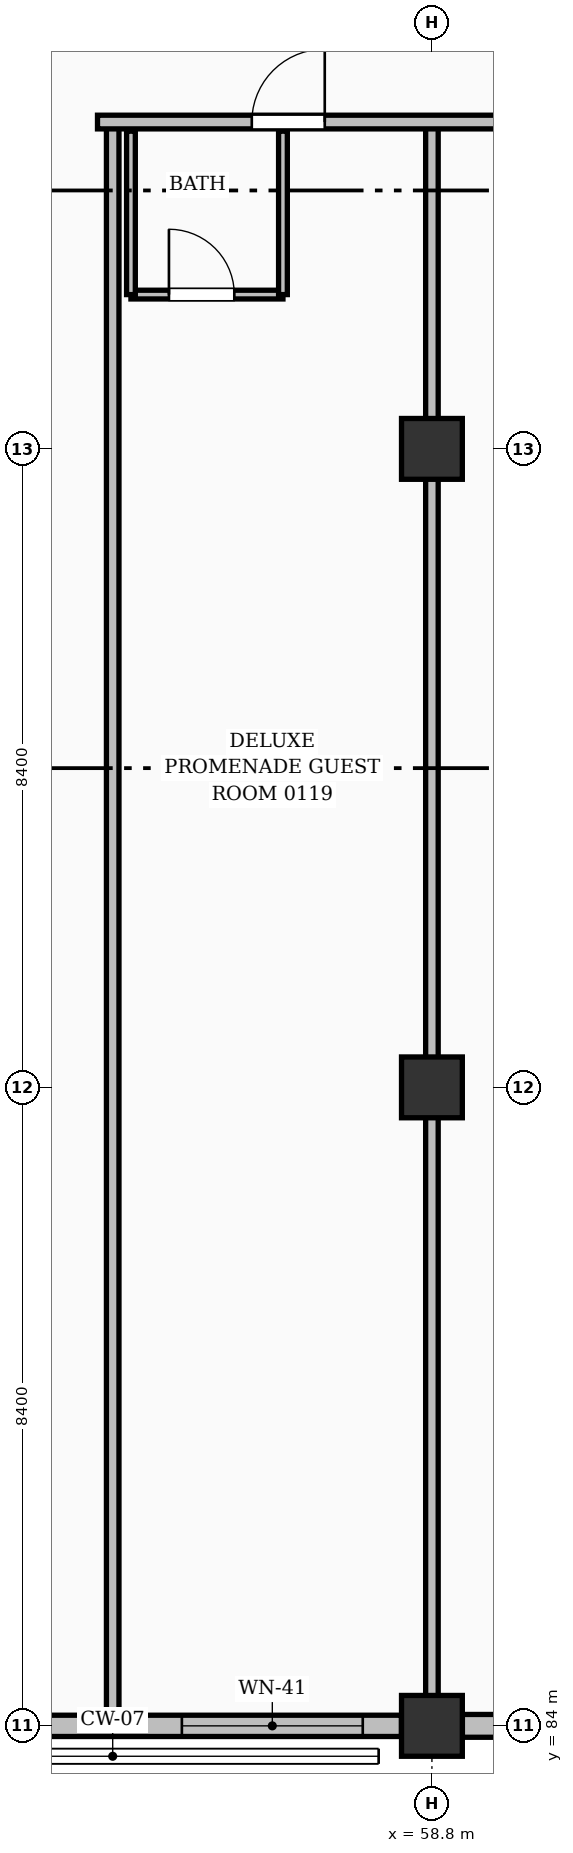
"""IFC4 building model, lengths in metres.
Left out: names, types, materials, properties, quantities, classifications, styles, units other than length and angle.
Written with IfcOpenShell. Run it as: python <this file> out.ifc"""

import sys

from ifc_helpers import new_model, si_unit, direction, frame, frame_2d, origin, origin_2d, place, context, subcontext, project, spatial, rectangle, extrude, element, fill, save


model = new_model("IFC4")
c1 = context("Model", 3, precision=1e-05, world=origin(), true_north=direction((0.0, 1.0)))
c2 = subcontext(c1, "Body", "Model", "MODEL_VIEW")
j1 = project(units=[si_unit("LENGTHUNIT", "METRE"), si_unit("PLANEANGLEUNIT", "RADIAN")], contexts=[c1])
p1 = place(None, origin())
s1 = spatial("IfcSite", under=j1, at=p1, CompositionType="ELEMENT")
p2 = place(p1, origin())
s2 = spatial("IfcBuilding", under=s1, at=p2, CompositionType="ELEMENT")
p3 = place(p2, frame((0.0, 0.0, 3.92)))
s3 = spatial("IfcBuildingStorey", under=s2, at=p3, CompositionType="ELEMENT", Elevation=3.92)
for number, where, z_axis, x_axis in (
    (1, (58.8, 84.0, 0.0), (0.0, 0.0, 1.0), (1.0, 0.0, 0.0)),
    (2, (58.8, 92.4, 0.0), (0.0, 0.0, 1.0), (1.0, 0.0, 0.0)),
    (3, (58.8, 100.8, 0.0), (0.0, 0.0, 1.0), (1.0, 0.0, 0.0)),
):
    element("IfcColumn", number, at=place(p3, frame(where, z_axis=z_axis, x_axis=x_axis)), inside=s3, PredefinedType="COLUMN", context=c2, shape_type="SweptSolid", body=[
        extrude(rectangle(XDim=0.8, YDim=0.8, at=origin_2d()), origin(), (0.0, 0.0, 1.0), 3.64),
    ])
p4 = place(p3, frame((50.801, 84.0, 0.0), z_axis=(0.0, 0.0, 1.0), x_axis=(1.0, 0.0, 0.0)))
e4 = element("IfcWall", 4, at=p4, inside=s3, PredefinedType="SOLIDWALL", context=c2, shape_type="SweptSolid", body=[
    extrude(rectangle(XDim=7.598, YDim=0.28, at=frame_2d((3.799, 0.0))), origin(), (0.0, 0.0, 1.0), 2.445),
])
p5 = place(p4, frame((0.489, 0.0, 0.25)))
e5 = element("IfcOpeningElement", 5, at=p5, cuts=e4, PredefinedType="OPENING", context=c2, shape_type="SweptSolid", body=[
    extrude(rectangle(XDim=2.42, YDim=1.9, at=frame_2d((1.21, 0.95))), frame((0.0, 0.15, 0.0), z_axis=(0.0, -1.0, 0.0), x_axis=(1.0, 0.0, 0.0)), (0.0, 0.0, 1.0), 0.3),
])
p6 = place(p4, frame((4.709, 0.0, 0.25)))
e6 = element("IfcOpeningElement", 6, at=p6, cuts=e4, PredefinedType="OPENING", context=c2, shape_type="SweptSolid", body=[
    extrude(rectangle(XDim=2.38, YDim=2.0, at=frame_2d((1.19, 1.0))), frame((0.0, 0.15, 0.0), z_axis=(0.0, -1.0, 0.0), x_axis=(1.0, 0.0, 0.0)), (0.0, 0.0, 1.0), 0.3),
])
p7 = place(p3, frame((59.201, 84.0, 0.0), z_axis=(0.0, 0.0, 1.0), x_axis=(1.0, 0.0, 0.0)))
e7 = element("IfcWall", 7, at=p7, inside=s3, PredefinedType="SOLIDWALL", context=c2, shape_type="SweptSolid", body=[
    extrude(rectangle(XDim=7.598, YDim=0.3, at=frame_2d((3.799, 0.0))), origin(), (0.0, 0.0, 1.0), 2.445),
])
p8 = place(p7, frame((0.874, 0.0, 0.0)))
e8 = element("IfcOpeningElement", 8, at=p8, cuts=e7, PredefinedType="OPENING", context=c2, shape_type="SweptSolid", body=[
    extrude(rectangle(XDim=1.75, YDim=2.08, at=frame_2d((0.875, 1.04))), frame((0.0, 0.16, 0.0), z_axis=(0.0, -1.0, 0.0), x_axis=(1.0, 0.0, 0.0)), (0.0, 0.0, 1.0), 0.32),
])
p9 = place(p7, frame((4.559, 0.0, 0.25)))
e9 = element("IfcOpeningElement", 9, at=p9, cuts=e7, PredefinedType="OPENING", context=c2, shape_type="SweptSolid", body=[
    extrude(rectangle(XDim=2.38, YDim=2.0, at=frame_2d((1.19, 1.0))), frame((0.0, 0.16, 0.0), z_axis=(0.0, -1.0, 0.0), x_axis=(1.0, 0.0, 0.0)), (0.0, 0.0, 1.0), 0.32),
])
p10 = place(p3, frame((54.84, 102.83, 0.0), z_axis=(0.0, 0.0, 1.0), x_axis=(1.0, 0.0, 0.0)))
e10 = element("IfcWall", 10, at=p10, inside=s3, PredefinedType="PARTITIONING", context=c2, shape_type="SweptSolid", body=[
    extrude(rectangle(XDim=2.0, YDim=0.115, at=frame_2d((1.0, 0.0))), origin(), (0.0, 0.0, 1.0), 3.36),
])
p11 = place(p10, frame((0.5, 0.0, 0.0)))
e11 = element("IfcOpeningElement", 11, at=p11, cuts=e10, PredefinedType="OPENING", context=c2, shape_type="SweptSolid", body=[
    extrude(rectangle(XDim=0.86, YDim=2.05, at=frame_2d((0.43, 1.025))), frame((0.0, 0.067, 0.0), z_axis=(0.0, -1.0, 0.0), x_axis=(1.0, 0.0, 0.0)), (0.0, 0.0, 1.0), 0.135),
])
for number, where, z_axis, x_axis in (
    (12, (54.84, 102.83, 0.0), (0.0, 0.0, 1.0), (0.0, 1.0, 0.0)),
    (13, (56.84, 102.83, 0.0), (0.0, 0.0, 1.0), (0.0, 1.0, 0.0)),
):
    element("IfcWall", number, at=place(p3, frame(where, z_axis=z_axis, x_axis=x_axis)), inside=s3, PredefinedType="PARTITIONING", context=c2, shape_type="SweptSolid", body=[
        extrude(rectangle(XDim=2.15, YDim=0.115, at=frame_2d((1.075, 0.0))), origin(), (0.0, 0.0, 1.0), 3.36),
    ])
p12 = place(p3, frame((54.6, 84.14, 0.0), z_axis=(0.0, 0.0, 1.0), x_axis=(0.0, 1.0, 0.0)))
e14 = element("IfcWall", 14, at=p12, inside=s3, PredefinedType="PARTITIONING", context=c2, shape_type="SweptSolid", body=[
    extrude(rectangle(XDim=20.96, YDim=0.165, at=frame_2d((10.48, 0.0))), origin(), (0.0, 0.0, 1.0), 3.36),
])
p13 = place(p3, frame((58.8, 84.35, 0.0), z_axis=(0.0, 0.0, 1.0), x_axis=(0.0, 1.0, 0.0)))
e15 = element("IfcWall", 15, at=p13, inside=s3, PredefinedType="PARTITIONING", context=c2, shape_type="SweptSolid", body=[
    extrude(rectangle(XDim=20.75, YDim=0.165, at=frame_2d((10.375, 0.0))), origin(), (0.0, 0.0, 1.0), 2.495),
])
p14 = place(p3, frame((54.4, 105.1, 0.0), z_axis=(0.0, 0.0, 1.0), x_axis=(1.0, 0.0, 0.0)))
e16 = element("IfcWall", 16, at=p14, inside=s3, PredefinedType="PARTITIONING", context=c2, shape_type="SweptSolid", body=[
    extrude(rectangle(XDim=29.41, YDim=0.18, at=frame_2d((14.705, 0.0))), origin(), (0.0, 0.0, 1.0), 3.36),
])
p15 = place(p14, frame((2.03, 0.0, 0.0)))
e17 = element("IfcOpeningElement", 17, at=p15, cuts=e16, PredefinedType="OPENING", context=c2, shape_type="SweptSolid", body=[
    extrude(rectangle(XDim=0.96, YDim=2.15, at=frame_2d((0.48, 1.075))), frame((0.0, 0.1, 0.0), z_axis=(0.0, -1.0, 0.0), x_axis=(1.0, 0.0, 0.0)), (0.0, 0.0, 1.0), 0.2),
])
p16 = place(p14, frame((5.77, 0.0, 0.0)))
e18 = element("IfcOpeningElement", 18, at=p16, cuts=e16, PredefinedType="OPENING", context=c2, shape_type="SweptSolid", body=[
    extrude(rectangle(XDim=0.96, YDim=2.15, at=frame_2d((0.48, 1.075))), frame((0.0, 0.1, 0.0), z_axis=(0.0, -1.0, 0.0), x_axis=(1.0, 0.0, 0.0)), (0.0, 0.0, 1.0), 0.2),
])
p17 = place(p14, frame((10.43, 0.0, 0.0)))
e19 = element("IfcOpeningElement", 19, at=p17, cuts=e16, PredefinedType="OPENING", context=c2, shape_type="SweptSolid", body=[
    extrude(rectangle(XDim=0.96, YDim=2.15, at=frame_2d((0.48, 1.075))), frame((0.0, 0.1, 0.0), z_axis=(0.0, -1.0, 0.0), x_axis=(1.0, 0.0, 0.0)), (0.0, 0.0, 1.0), 0.2),
])
p18 = place(p14, frame((14.17, 0.0, 0.0)))
e20 = element("IfcOpeningElement", 20, at=p18, cuts=e16, PredefinedType="OPENING", context=c2, shape_type="SweptSolid", body=[
    extrude(rectangle(XDim=0.96, YDim=2.15, at=frame_2d((0.48, 1.075))), frame((0.0, 0.1, 0.0), z_axis=(0.0, -1.0, 0.0), x_axis=(1.0, 0.0, 0.0)), (0.0, 0.0, 1.0), 0.2),
])
p19 = place(p14, frame((18.83, 0.0, 0.0)))
e21 = element("IfcOpeningElement", 21, at=p19, cuts=e16, PredefinedType="OPENING", context=c2, shape_type="SweptSolid", body=[
    extrude(rectangle(XDim=0.96, YDim=2.15, at=frame_2d((0.48, 1.075))), frame((0.0, 0.1, 0.0), z_axis=(0.0, -1.0, 0.0), x_axis=(1.0, 0.0, 0.0)), (0.0, 0.0, 1.0), 0.2),
])
p20 = place(p14, frame((22.57, 0.0, 0.0)))
e22 = element("IfcOpeningElement", 22, at=p20, cuts=e16, PredefinedType="OPENING", context=c2, shape_type="SweptSolid", body=[
    extrude(rectangle(XDim=0.96, YDim=2.15, at=frame_2d((0.48, 1.075))), frame((0.0, 0.1, 0.0), z_axis=(0.0, -1.0, 0.0), x_axis=(1.0, 0.0, 0.0)), (0.0, 0.0, 1.0), 0.2),
])
p21 = place(p14, frame((27.23, 0.0, 0.0)))
e23 = element("IfcOpeningElement", 23, at=p21, cuts=e16, PredefinedType="OPENING", context=c2, shape_type="SweptSolid", body=[
    extrude(rectangle(XDim=0.96, YDim=2.15, at=frame_2d((0.48, 1.075))), frame((0.0, 0.1, 0.0), z_axis=(0.0, -1.0, 0.0), x_axis=(1.0, 0.0, 0.0)), (0.0, 0.0, 1.0), 0.2),
])
p22 = place(p6, origin())
e24 = element("IfcWindow", 24, at=p22, inside=s3, PartitioningType="DOUBLE_PANEL_VERTICAL", PredefinedType="WINDOW", context=c2, shape_type="SweptSolid", body=[
    extrude(rectangle(XDim=2.38, YDim=2.0, at=frame_2d((1.19, 1.0))), frame((0.0, 0.03, 0.0), z_axis=(0.0, -1.0, 0.0), x_axis=(1.0, 0.0, 0.0)), (0.0, 0.0, 1.0), 0.06),
])
fill(e6, e24)
p23 = place(p11, origin())
e25 = element("IfcDoor", 25, at=p23, inside=s3, OperationType="SINGLE_SWING_LEFT", PredefinedType="DOOR", context=c2, shape_type="SweptSolid", body=[
    extrude(rectangle(XDim=0.86, YDim=2.05, at=frame_2d((0.43, 1.025))), frame((0.0, 0.025, 0.0), z_axis=(0.0, -1.0, 0.0), x_axis=(1.0, 0.0, 0.0)), (0.0, 0.0, 1.0), 0.05),
])
fill(e11, e25)
p24 = place(p15, origin())
e26 = element("IfcDoor", 26, at=p24, inside=s3, OperationType="SINGLE_SWING_RIGHT", PredefinedType="DOOR", context=c2, shape_type="SweptSolid", body=[
    extrude(rectangle(XDim=0.96, YDim=2.15, at=frame_2d((0.48, 1.075))), frame((0.0, 0.025, 0.0), z_axis=(0.0, -1.0, 0.0), x_axis=(1.0, 0.0, 0.0)), (0.0, 0.0, 1.0), 0.05),
])
fill(e17, e26)
save(model, sys.argv[1])
